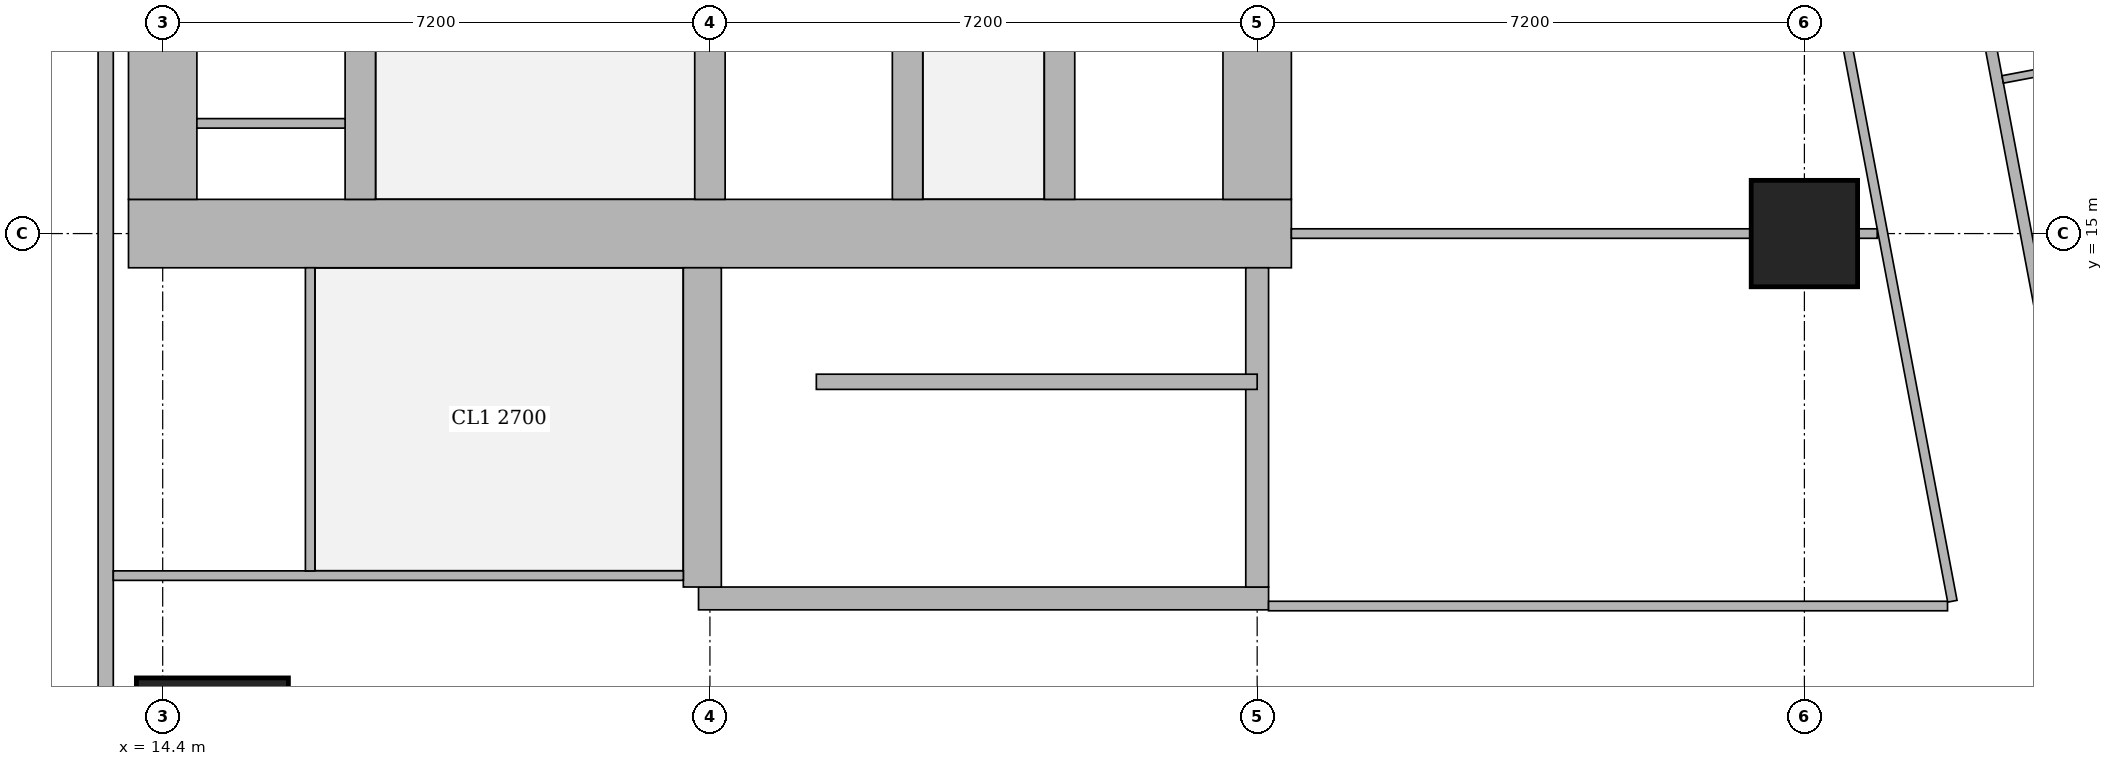
"""IFC4 building model, lengths in metres.
Left out: names, types, materials, properties, quantities, classifications, styles, units other than length and angle.
Written with IfcOpenShell. Run it as: python <this file> out.ifc"""

import sys

from ifc_helpers import new_model, si_unit, direction, frame, frame_2d, origin, origin_2d, place, context, subcontext, project, spatial, rectangle, extrude, element, fill, save


model = new_model("IFC4")
c1 = context("Model", 3, precision=1e-05, world=origin(), true_north=direction((0.0, 1.0)))
c2 = subcontext(c1, "Body", "Model", "MODEL_VIEW")
j1 = project(units=[si_unit("LENGTHUNIT", "METRE"), si_unit("PLANEANGLEUNIT", "RADIAN")], contexts=[c1])
p1 = place(None, origin())
s1 = spatial("IfcSite", under=j1, at=p1, CompositionType="ELEMENT")
p2 = place(p1, origin())
s2 = spatial("IfcBuilding", under=s1, at=p2, CompositionType="ELEMENT")
p3 = place(p2, frame((0.0, 0.0, 251.6)))
s3 = spatial("IfcBuildingStorey", under=s2, at=p3, CompositionType="ELEMENT", Elevation=251.6)
p4 = place(p3, frame((15.054, 8.154, 0.0), z_axis=(0.0, 0.0, 1.0), x_axis=(1.0, 0.0, 0.0)))
e1 = element("IfcColumn", 1, at=p4, inside=s3, PredefinedType="COLUMN", context=c2, shape_type="SweptSolid", body=[
    extrude(rectangle(XDim=2.0, YDim=2.0, at=origin_2d()), origin(), (0.0, 0.0, 1.0), 3.75),
])
p5 = place(p3, frame((36.0, 15.0, 0.0), z_axis=(0.0, 0.0, 1.0), x_axis=(1.0, 0.0, 0.0)))
e2 = element("IfcColumn", 2, at=p5, inside=s3, PredefinedType="COLUMN", context=c2, shape_type="SweptSolid", body=[
    extrude(rectangle(XDim=1.4, YDim=1.4, at=origin_2d()), origin(), (0.0, 0.0, 1.0), 3.75),
])
p6 = place(p3, frame((13.95, 15.0, 0.0), z_axis=(0.0, 0.0, 1.0), x_axis=(1.0, 0.0, 0.0)))
e3 = element("IfcWall", 3, at=p6, inside=s3, PredefinedType="SHEAR", context=c2, shape_type="SweptSolid", body=[
    extrude(rectangle(XDim=15.3, YDim=0.9, at=frame_2d((7.65, 0.0))), origin(), (0.0, 0.0, 1.0), 3.75),
])
p7 = place(p6, frame((4.45, 0.0, 0.0)))
e4 = element("IfcOpeningElement", 4, at=p7, cuts=e3, PredefinedType="OPENING", context=c2, shape_type="SweptSolid", body=[
    extrude(rectangle(XDim=1.8, YDim=2.1, at=frame_2d((0.9, 1.05))), frame((0.0, 0.46, 0.0), z_axis=(0.0, -1.0, 0.0), x_axis=(1.0, 0.0, 0.0)), (0.0, 0.0, 1.0), 0.92),
])
p8 = place(p6, frame((10.7, 0.0, 0.0)))
e5 = element("IfcOpeningElement", 5, at=p8, cuts=e3, PredefinedType="OPENING", context=c2, shape_type="SweptSolid", body=[
    extrude(rectangle(XDim=1.1, YDim=2.1, at=frame_2d((0.55, 1.05))), frame((0.0, 0.46, 0.0), z_axis=(0.0, -1.0, 0.0), x_axis=(1.0, 0.0, 0.0)), (0.0, 0.0, 1.0), 0.92),
])
for number, where, z_axis, x_axis in (
    (6, (14.4, 15.45, 0.0), (0.0, 0.0, 1.0), (0.0, 1.0, 0.0)),
    (7, (28.8, 15.45, 0.0), (0.0, 0.0, 1.0), (0.0, 1.0, 0.0)),
):
    element("IfcWall", number, at=place(p3, frame(where, z_axis=z_axis, x_axis=x_axis)), inside=s3, PredefinedType="SHEAR", context=c2, shape_type="SweptSolid", body=[
        extrude(rectangle(XDim=14.1, YDim=0.9, at=frame_2d((7.05, 0.0))), origin(), (0.0, 0.0, 1.0), 3.75),
    ])
p9 = place(p3, frame((17.0, 15.45, 0.0), z_axis=(0.0, 0.0, 1.0), x_axis=(0.0, 1.0, 0.0)))
e8 = element("IfcWall", 8, at=p9, inside=s3, PredefinedType="SHEAR", context=c2, shape_type="SweptSolid", body=[
    extrude(rectangle(XDim=14.1, YDim=0.4, at=frame_2d((7.05, 0.0))), origin(), (0.0, 0.0, 1.0), 3.75),
])
p10 = place(p9, frame((1.05, 0.0, 0.0)))
e9 = element("IfcOpeningElement", 9, at=p10, cuts=e8, PredefinedType="OPENING", context=c2, shape_type="SweptSolid", body=[
    extrude(rectangle(XDim=1.0, YDim=2.1, at=frame_2d((0.5, 1.05))), frame((0.0, 0.21, 0.0), z_axis=(0.0, -1.0, 0.0), x_axis=(1.0, 0.0, 0.0)), (0.0, 0.0, 1.0), 0.42),
])
p11 = place(p9, frame((4.675, 0.0, 0.0)))
e10 = element("IfcOpeningElement", 10, at=p11, cuts=e8, PredefinedType="OPENING", context=c2, shape_type="SweptSolid", body=[
    extrude(rectangle(XDim=1.0, YDim=2.1, at=frame_2d((0.5, 1.05))), frame((0.0, 0.21, 0.0), z_axis=(0.0, -1.0, 0.0), x_axis=(1.0, 0.0, 0.0)), (0.0, 0.0, 1.0), 0.42),
])
p12 = place(p9, frame((8.425, 0.0, 0.0)))
e11 = element("IfcOpeningElement", 11, at=p12, cuts=e8, PredefinedType="OPENING", context=c2, shape_type="SweptSolid", body=[
    extrude(rectangle(XDim=1.0, YDim=2.1, at=frame_2d((0.5, 1.05))), frame((0.0, 0.21, 0.0), z_axis=(0.0, -1.0, 0.0), x_axis=(1.0, 0.0, 0.0)), (0.0, 0.0, 1.0), 0.42),
])
p13 = place(p9, frame((12.175, 0.0, 0.0)))
e12 = element("IfcOpeningElement", 12, at=p13, cuts=e8, PredefinedType="OPENING", context=c2, shape_type="SweptSolid", body=[
    extrude(rectangle(XDim=1.0, YDim=2.1, at=frame_2d((0.5, 1.05))), frame((0.0, 0.21, 0.0), z_axis=(0.0, -1.0, 0.0), x_axis=(1.0, 0.0, 0.0)), (0.0, 0.0, 1.0), 0.42),
])
p14 = place(p3, frame((21.6, 15.45, 0.0), z_axis=(0.0, 0.0, 1.0), x_axis=(0.0, 1.0, 0.0)))
e13 = element("IfcWall", 13, at=p14, inside=s3, PredefinedType="SHEAR", context=c2, shape_type="SweptSolid", body=[
    extrude(rectangle(XDim=14.1, YDim=0.4, at=frame_2d((7.05, 0.0))), origin(), (0.0, 0.0, 1.0), 3.75),
])
p15 = place(p14, frame((0.875, 0.0, 0.0)))
e14 = element("IfcOpeningElement", 14, at=p15, cuts=e13, PredefinedType="OPENING", context=c2, shape_type="SweptSolid", body=[
    extrude(rectangle(XDim=1.1, YDim=2.1, at=frame_2d((0.55, 1.05))), frame((0.0, 0.21, 0.0), z_axis=(0.0, -1.0, 0.0), x_axis=(1.0, 0.0, 0.0)), (0.0, 0.0, 1.0), 0.42),
])
p16 = place(p14, frame((4.625, 0.0, 0.0)))
e15 = element("IfcOpeningElement", 15, at=p16, cuts=e13, PredefinedType="OPENING", context=c2, shape_type="SweptSolid", body=[
    extrude(rectangle(XDim=1.1, YDim=2.1, at=frame_2d((0.55, 1.05))), frame((0.0, 0.21, 0.0), z_axis=(0.0, -1.0, 0.0), x_axis=(1.0, 0.0, 0.0)), (0.0, 0.0, 1.0), 0.42),
])
p17 = place(p14, frame((8.375, 0.0, 0.0)))
e16 = element("IfcOpeningElement", 16, at=p17, cuts=e13, PredefinedType="OPENING", context=c2, shape_type="SweptSolid", body=[
    extrude(rectangle(XDim=1.1, YDim=2.1, at=frame_2d((0.55, 1.05))), frame((0.0, 0.21, 0.0), z_axis=(0.0, -1.0, 0.0), x_axis=(1.0, 0.0, 0.0)), (0.0, 0.0, 1.0), 0.42),
])
p18 = place(p14, frame((12.125, 0.0, 0.0)))
e17 = element("IfcOpeningElement", 17, at=p18, cuts=e13, PredefinedType="OPENING", context=c2, shape_type="SweptSolid", body=[
    extrude(rectangle(XDim=1.1, YDim=2.1, at=frame_2d((0.55, 1.05))), frame((0.0, 0.21, 0.0), z_axis=(0.0, -1.0, 0.0), x_axis=(1.0, 0.0, 0.0)), (0.0, 0.0, 1.0), 0.42),
])
p19 = place(p3, frame((24.2, 15.45, 0.0), z_axis=(0.0, 0.0, 1.0), x_axis=(0.0, 1.0, 0.0)))
e18 = element("IfcWall", 18, at=p19, inside=s3, PredefinedType="SHEAR", context=c2, shape_type="SweptSolid", body=[
    extrude(rectangle(XDim=14.1, YDim=0.4, at=frame_2d((7.05, 0.0))), origin(), (0.0, 0.0, 1.0), 3.75),
])
p20 = place(p3, frame((26.2, 15.45, 0.0), z_axis=(0.0, 0.0, 1.0), x_axis=(0.0, 1.0, 0.0)))
e19 = element("IfcWall", 19, at=p20, inside=s3, PredefinedType="SHEAR", context=c2, shape_type="SweptSolid", body=[
    extrude(rectangle(XDim=3.1, YDim=0.4, at=frame_2d((1.55, 0.0))), origin(), (0.0, 0.0, 1.0), 3.75),
])
p21 = place(p20, frame((0.825, 0.0, 0.0)))
e20 = element("IfcOpeningElement", 20, at=p21, cuts=e19, PredefinedType="OPENING", context=c2, shape_type="SweptSolid", body=[
    extrude(rectangle(XDim=1.2, YDim=2.1, at=frame_2d((0.6, 1.05))), frame((0.0, 0.21, 0.0), z_axis=(0.0, -1.0, 0.0), x_axis=(1.0, 0.0, 0.0)), (0.0, 0.0, 1.0), 0.42),
])
p22 = place(p3, frame((21.45, 10.2, 0.0), z_axis=(0.0, 0.0, 1.0), x_axis=(1.0, 0.0, 0.0)))
e21 = element("IfcWall", 21, at=p22, inside=s3, PredefinedType="SHEAR", context=c2, shape_type="SweptSolid", body=[
    extrude(rectangle(XDim=7.5, YDim=0.3, at=frame_2d((3.75, 0.0))), origin(), (0.0, 0.0, 1.0), 3.75),
])
p23 = place(p22, frame((1.2, 0.0, 0.0)))
e22 = element("IfcOpeningElement", 22, at=p23, cuts=e21, PredefinedType="OPENING", context=c2, shape_type="SweptSolid", body=[
    extrude(rectangle(XDim=1.1, YDim=2.1, at=frame_2d((0.55, 1.05))), frame((0.0, 0.16, 0.0), z_axis=(0.0, -1.0, 0.0), x_axis=(1.0, 0.0, 0.0)), (0.0, 0.0, 1.0), 0.32),
])
p24 = place(p3, frame((21.5, 10.35, 0.0), z_axis=(0.0, 0.0, 1.0), x_axis=(0.0, 1.0, 0.0)))
e23 = element("IfcWall", 23, at=p24, inside=s3, PredefinedType="SHEAR", context=c2, shape_type="SweptSolid", body=[
    extrude(rectangle(XDim=4.2, YDim=0.5, at=frame_2d((2.1, 0.0))), origin(), (0.0, 0.0, 1.0), 3.75),
])
p25 = place(p3, frame((28.8, 10.35, 0.0), z_axis=(0.0, 0.0, 1.0), x_axis=(0.0, 1.0, 0.0)))
e24 = element("IfcWall", 24, at=p25, inside=s3, PredefinedType="SHEAR", context=c2, shape_type="SweptSolid", body=[
    extrude(rectangle(XDim=4.2, YDim=0.3, at=frame_2d((2.1, 0.0))), origin(), (0.0, 0.0, 1.0), 3.75),
])
p26 = place(p3, frame((13.65, 43.037, 0.0), z_axis=(0.0, 0.0, 1.0), x_axis=(0.0, -1.0, 0.0)))
e25 = element("IfcWall", 25, at=p26, inside=s3, PredefinedType="SOLIDWALL", context=c2, shape_type="SweptSolid", body=[
    extrude(rectangle(XDim=35.374, YDim=0.2, at=frame_2d((17.687, 0.0))), origin(), (0.0, 0.0, 1.0), 3.5),
])
p27 = place(p26, frame((1.959, 0.0, 0.9)))
e26 = element("IfcOpeningElement", 26, at=p27, cuts=e25, PredefinedType="OPENING", context=c2, shape_type="SweptSolid", body=[
    extrude(rectangle(XDim=1.8, YDim=1.5, at=frame_2d((0.9, 0.75))), frame((0.0, 0.11, 0.0), z_axis=(0.0, -1.0, 0.0), x_axis=(1.0, 0.0, 0.0)), (0.0, 0.0, 1.0), 0.22),
])
p28 = place(p3, frame((33.781, 42.186, 0.0), z_axis=(0.0, 0.0, 1.0), x_axis=(0.185593518645, -0.9826266055, 0.0)))
e27 = element("IfcWall", 27, at=p28, inside=s3, PredefinedType="SOLIDWALL", context=c2, shape_type="SweptSolid", body=[
    extrude(rectangle(XDim=35.961, YDim=0.15, at=frame_2d((17.98, 0.0))), origin(), (0.0, 0.0, 1.0), 2.5),
])
p29 = place(p28, frame((7.183, 0.0, 0.0)))
e28 = element("IfcOpeningElement", 28, at=p29, cuts=e27, PredefinedType="OPENING", context=c2, shape_type="SweptSolid", body=[
    extrude(rectangle(XDim=1.0, YDim=2.1, at=frame_2d((0.5, 1.05))), frame((0.0, 0.085, 0.0), z_axis=(0.0, -1.0, 0.0), x_axis=(1.0, 0.0, 0.0)), (0.0, 0.0, 1.0), 0.17),
])
p30 = place(p28, frame((11.76, 0.0, 0.0)))
e29 = element("IfcOpeningElement", 29, at=p30, cuts=e27, PredefinedType="OPENING", context=c2, shape_type="SweptSolid", body=[
    extrude(rectangle(XDim=1.0, YDim=2.1, at=frame_2d((0.5, 1.05))), frame((0.0, 0.085, 0.0), z_axis=(0.0, -1.0, 0.0), x_axis=(1.0, 0.0, 0.0)), (0.0, 0.0, 1.0), 0.17),
])
p31 = place(p28, frame((23.863, 0.0, 0.0)))
e30 = element("IfcOpeningElement", 30, at=p31, cuts=e27, PredefinedType="OPENING", context=c2, shape_type="SweptSolid", body=[
    extrude(rectangle(XDim=1.0, YDim=2.1, at=frame_2d((0.5, 1.05))), frame((0.0, 0.085, 0.0), z_axis=(0.0, -1.0, 0.0), x_axis=(1.0, 0.0, 0.0)), (0.0, 0.0, 1.0), 0.17),
])
p32 = place(p28, frame((30.502, 0.0, 0.0)))
e31 = element("IfcOpeningElement", 31, at=p32, cuts=e27, PredefinedType="OPENING", context=c2, shape_type="SweptSolid", body=[
    extrude(rectangle(XDim=1.0, YDim=2.1, at=frame_2d((0.5, 1.05))), frame((0.0, 0.085, 0.0), z_axis=(0.0, -1.0, 0.0), x_axis=(1.0, 0.0, 0.0)), (0.0, 0.0, 1.0), 0.17),
])
p33 = place(p3, frame((42.074, 17.682, 0.0), z_axis=(0.0, 0.0, 1.0), x_axis=(-0.982660701716, -0.185412904897, 0.0)))
e32 = element("IfcWall", 32, at=p33, inside=s3, PredefinedType="PARTITIONING", context=c2, shape_type="SweptSolid", body=[
    extrude(rectangle(XDim=3.526, YDim=0.1, at=frame_2d((1.763, 0.0))), origin(), (0.0, 0.0, 1.0), 3.5),
])
p34 = place(p33, frame((1.326, 0.0, 0.0)))
e33 = element("IfcOpeningElement", 33, at=p34, cuts=e32, PredefinedType="OPENING", context=c2, shape_type="SweptSolid", body=[
    extrude(rectangle(XDim=0.9, YDim=2.1, at=frame_2d((0.45, 1.05))), frame((0.0, 0.06, 0.0), z_axis=(0.0, -1.0, 0.0), x_axis=(1.0, 0.0, 0.0)), (0.0, 0.0, 1.0), 0.12),
])
p35 = place(p3, frame((13.75, 10.5, 0.0), z_axis=(0.0, 0.0, 1.0), x_axis=(1.0, 0.0, 0.0)))
e34 = element("IfcWall", 34, at=p35, inside=s3, PredefinedType="PARTITIONING", context=c2, shape_type="SweptSolid", body=[
    extrude(rectangle(XDim=7.5, YDim=0.125, at=frame_2d((3.75, 0.0))), origin(), (0.0, 0.0, 1.0), 3.5),
])
p36 = place(p35, frame((4.245, 0.0, 0.0)))
e35 = element("IfcOpeningElement", 35, at=p36, cuts=e34, PredefinedType="OPENING", context=c2, shape_type="SweptSolid", body=[
    extrude(rectangle(XDim=1.8, YDim=2.1, at=frame_2d((0.9, 1.05))), frame((0.0, 0.073, 0.0), z_axis=(0.0, -1.0, 0.0), x_axis=(1.0, 0.0, 0.0)), (0.0, 0.0, 1.0), 0.145),
])
p37 = place(p3, frame((16.34, 10.562, 0.0), z_axis=(0.0, 0.0, 1.0), x_axis=(0.0, 1.0, 0.0)))
e36 = element("IfcWall", 36, at=p37, inside=s3, PredefinedType="PARTITIONING", context=c2, shape_type="SweptSolid", body=[
    extrude(rectangle(XDim=3.988, YDim=0.125, at=frame_2d((1.994, 0.0))), origin(), (0.0, 0.0, 1.0), 3.5),
])
p38 = place(p37, frame((1.438, 0.0, 0.0)))
e37 = element("IfcOpeningElement", 37, at=p38, cuts=e36, PredefinedType="OPENING", context=c2, shape_type="SweptSolid", body=[
    extrude(rectangle(XDim=1.0, YDim=2.1, at=frame_2d((0.5, 1.05))), frame((0.0, 0.073, 0.0), z_axis=(0.0, -1.0, 0.0), x_axis=(1.0, 0.0, 0.0)), (0.0, 0.0, 1.0), 0.145),
])
p39 = place(p3, frame((28.95, 10.1, 0.0), z_axis=(0.0, 0.0, 1.0), x_axis=(1.0, 0.0, 0.0)))
e38 = element("IfcWall", 38, at=p39, inside=s3, PredefinedType="PARTITIONING", context=c2, shape_type="SweptSolid", body=[
    extrude(rectangle(XDim=8.933, YDim=0.125, at=frame_2d((4.467, 0.0))), origin(), (0.0, 0.0, 1.0), 3.5),
])
p40 = place(p3, frame((37.947, 10.163, 0.0), z_axis=(0.0, 0.0, 1.0), x_axis=(-0.185589250699, 0.982627411599, 0.0)))
e39 = element("IfcWall", 39, at=p40, inside=s3, PredefinedType="PARTITIONING", context=c2, shape_type="SweptSolid", body=[
    extrude(rectangle(XDim=12.555, YDim=0.125, at=frame_2d((6.277, 0.0))), origin(), (0.0, 0.0, 1.0), 2.5),
])
p41 = place(p40, frame((0.708, 0.0, 0.0)))
e40 = element("IfcOpeningElement", 40, at=p41, cuts=e39, PredefinedType="OPENING", context=c2, shape_type="SweptSolid", body=[
    extrude(rectangle(XDim=1.0, YDim=2.1, at=frame_2d((0.5, 1.05))), frame((0.0, 0.073, 0.0), z_axis=(0.0, -1.0, 0.0), x_axis=(1.0, 0.0, 0.0)), (0.0, 0.0, 1.0), 0.145),
])
p42 = place(p40, frame((5.9, 0.0, 0.0)))
e41 = element("IfcOpeningElement", 41, at=p42, cuts=e39, PredefinedType="OPENING", context=c2, shape_type="SweptSolid", body=[
    extrude(rectangle(XDim=1.0, YDim=2.1, at=frame_2d((0.5, 1.05))), frame((0.0, 0.073, 0.0), z_axis=(0.0, -1.0, 0.0), x_axis=(1.0, 0.0, 0.0)), (0.0, 0.0, 1.0), 0.145),
])
p43 = place(p40, frame((9.562, 0.0, 0.0)))
e42 = element("IfcOpeningElement", 42, at=p43, cuts=e39, PredefinedType="OPENING", context=c2, shape_type="SweptSolid", body=[
    extrude(rectangle(XDim=1.0, YDim=2.1, at=frame_2d((0.5, 1.05))), frame((0.0, 0.073, 0.0), z_axis=(0.0, -1.0, 0.0), x_axis=(1.0, 0.0, 0.0)), (0.0, 0.0, 1.0), 0.145),
])
p44 = place(p3, frame((29.25, 15.0, 0.0), z_axis=(0.0, 0.0, 1.0), x_axis=(1.0, 0.0, 0.0)))
e43 = element("IfcWall", 43, at=p44, inside=s3, PredefinedType="PARTITIONING", context=c2, shape_type="SweptSolid", body=[
    extrude(rectangle(XDim=6.049, YDim=0.125, at=frame_2d((3.024, 0.0))), origin(), (0.0, 0.0, 1.0), 3.5),
])
p45 = place(p3, frame((36.701, 15.0, 0.0), z_axis=(0.0, 0.0, 1.0), x_axis=(1.0, 0.0, 0.0)))
e44 = element("IfcWall", 44, at=p45, inside=s3, PredefinedType="PARTITIONING", context=c2, shape_type="SweptSolid", body=[
    extrude(rectangle(XDim=0.257, YDim=0.125, at=frame_2d((0.128, 0.0))), origin(), (0.0, 0.0, 1.0), 3.5),
])
p46 = place(p3, frame((14.85, 16.45, 0.0), z_axis=(0.0, 0.0, 1.0), x_axis=(1.0, 0.0, 0.0)))
e45 = element("IfcWall", 45, at=p46, inside=s3, PredefinedType="PARTITIONING", context=c2, shape_type="SweptSolid", body=[
    extrude(rectangle(XDim=1.95, YDim=0.125, at=frame_2d((0.975, 0.0))), origin(), (0.0, 0.0, 1.0), 3.5),
])
p47 = place(p46, frame((0.2, 0.0, 0.0)))
e46 = element("IfcOpeningElement", 46, at=p47, cuts=e45, PredefinedType="OPENING", context=c2, shape_type="SweptSolid", body=[
    extrude(rectangle(XDim=1.0, YDim=2.1, at=frame_2d((0.5, 1.05))), frame((0.0, 0.073, 0.0), z_axis=(0.0, -1.0, 0.0), x_axis=(1.0, 0.0, 0.0)), (0.0, 0.0, 1.0), 0.145),
])
p48 = place(p3, frame((23.0, 13.05, 0.0), z_axis=(0.0, 0.0, 1.0), x_axis=(1.0, 0.0, 0.0)))
e47 = element("IfcWall", 47, at=p48, inside=s3, PredefinedType="SHEAR", context=c2, shape_type="SweptSolid", body=[
    extrude(rectangle(XDim=5.8, YDim=0.2, at=frame_2d((2.9, 0.0))), origin(), (0.0, 0.0, 1.0), 3.75),
])
p49 = place(p38, origin())
e48 = element("IfcDoor", 48, at=p49, inside=s3, OperationType="SINGLE_SWING_LEFT", PredefinedType="DOOR", context=c2, shape_type="SweptSolid", body=[
    extrude(rectangle(XDim=1.0, YDim=2.1, at=frame_2d((0.5, 1.05))), frame((0.0, 0.025, 0.0), z_axis=(0.0, -1.0, 0.0), x_axis=(1.0, 0.0, 0.0)), (0.0, 0.0, 1.0), 0.05),
])
fill(e37, e48)
p50 = place(p36, origin())
e49 = element("IfcDoor", 49, at=p50, inside=s3, OperationType="DOUBLE_DOOR_SINGLE_SWING", PredefinedType="DOOR", context=c2, shape_type="SweptSolid", body=[
    extrude(rectangle(XDim=1.8, YDim=2.1, at=frame_2d((0.9, 1.05))), frame((0.0, 0.025, 0.0), z_axis=(0.0, -1.0, 0.0), x_axis=(1.0, 0.0, 0.0)), (0.0, 0.0, 1.0), 0.05),
])
fill(e35, e49)
p51 = place(p41, origin())
e50 = element("IfcDoor", 50, at=p51, inside=s3, OperationType="SINGLE_SWING_LEFT", PredefinedType="DOOR", context=c2, shape_type="SweptSolid", body=[
    extrude(rectangle(XDim=1.0, YDim=2.1, at=frame_2d((0.5, 1.05))), frame((0.0, 0.025, 0.0), z_axis=(0.0, -1.0, 0.0), x_axis=(1.0, 0.0, 0.0)), (0.0, 0.0, 1.0), 0.05),
])
fill(e40, e50)
p52 = place(p42, origin())
e51 = element("IfcDoor", 51, at=p52, inside=s3, OperationType="SINGLE_SWING_LEFT", PredefinedType="DOOR", context=c2, shape_type="SweptSolid", body=[
    extrude(rectangle(XDim=1.0, YDim=2.1, at=frame_2d((0.5, 1.05))), frame((0.0, 0.025, 0.0), z_axis=(0.0, -1.0, 0.0), x_axis=(1.0, 0.0, 0.0)), (0.0, 0.0, 1.0), 0.05),
])
fill(e41, e51)
p53 = place(p47, origin())
e52 = element("IfcDoor", 52, at=p53, inside=s3, OperationType="SINGLE_SWING_RIGHT", PredefinedType="DOOR", context=c2, shape_type="SweptSolid", body=[
    extrude(rectangle(XDim=1.0, YDim=2.1, at=frame_2d((0.5, 1.05))), frame((0.0, 0.025, 0.0), z_axis=(0.0, -1.0, 0.0), x_axis=(1.0, 0.0, 0.0)), (0.0, 0.0, 1.0), 0.05),
])
fill(e46, e52)
p54 = place(p10, origin())
e53 = element("IfcDoor", 53, at=p54, inside=s3, OperationType="SINGLE_SWING_LEFT", PredefinedType="DOOR", context=c2, shape_type="SweptSolid", body=[
    extrude(rectangle(XDim=1.0, YDim=2.1, at=frame_2d((0.5, 1.05))), frame((0.0, 0.025, 0.0), z_axis=(0.0, -1.0, 0.0), x_axis=(1.0, 0.0, 0.0)), (0.0, 0.0, 1.0), 0.05),
])
fill(e9, e53)
p55 = place(p7, origin())
e54 = element("IfcDoor", 54, at=p55, inside=s3, OperationType="DOUBLE_DOOR_SINGLE_SWING", PredefinedType="DOOR", context=c2, shape_type="SweptSolid", body=[
    extrude(rectangle(XDim=1.8, YDim=2.1, at=frame_2d((0.9, 1.05))), frame((0.0, 0.025, 0.0), z_axis=(0.0, -1.0, 0.0), x_axis=(1.0, 0.0, 0.0)), (0.0, 0.0, 1.0), 0.05),
])
fill(e4, e54)
p56 = place(p8, origin())
e55 = element("IfcDoor", 55, at=p56, inside=s3, OperationType="SINGLE_SWING_LEFT", PredefinedType="DOOR", context=c2, shape_type="SweptSolid", body=[
    extrude(rectangle(XDim=1.1, YDim=2.1, at=frame_2d((0.55, 1.05))), frame((0.0, 0.025, 0.0), z_axis=(0.0, -1.0, 0.0), x_axis=(1.0, 0.0, 0.0)), (0.0, 0.0, 1.0), 0.05),
])
fill(e5, e55)
p57 = place(p21, origin())
e56 = element("IfcDoor", 56, at=p57, inside=s3, OperationType="DOUBLE_DOOR_SLIDING", PredefinedType="DOOR", context=c2, shape_type="SweptSolid", body=[
    extrude(rectangle(XDim=1.2, YDim=2.1, at=frame_2d((0.6, 1.05))), frame((0.0, 0.025, 0.0), z_axis=(0.0, -1.0, 0.0), x_axis=(1.0, 0.0, 0.0)), (0.0, 0.0, 1.0), 0.05),
])
fill(e20, e56)
p58 = place(p15, origin())
e57 = element("IfcDoor", 57, at=p58, inside=s3, OperationType="DOUBLE_DOOR_SLIDING", PredefinedType="DOOR", context=c2, shape_type="SweptSolid", body=[
    extrude(rectangle(XDim=1.1, YDim=2.1, at=frame_2d((0.55, 1.05))), frame((0.0, 0.025, 0.0), z_axis=(0.0, -1.0, 0.0), x_axis=(1.0, 0.0, 0.0)), (0.0, 0.0, 1.0), 0.05),
])
fill(e14, e57)
p59 = place(p23, origin())
e58 = element("IfcDoor", 58, at=p59, inside=s3, OperationType="SINGLE_SWING_LEFT", PredefinedType="DOOR", context=c2, shape_type="SweptSolid", body=[
    extrude(rectangle(XDim=1.1, YDim=2.1, at=frame_2d((0.55, 1.05))), frame((0.0, 0.025, 0.0), z_axis=(0.0, -1.0, 0.0), x_axis=(1.0, 0.0, 0.0)), (0.0, 0.0, 1.0), 0.05),
])
fill(e22, e58)
save(model, sys.argv[1])
